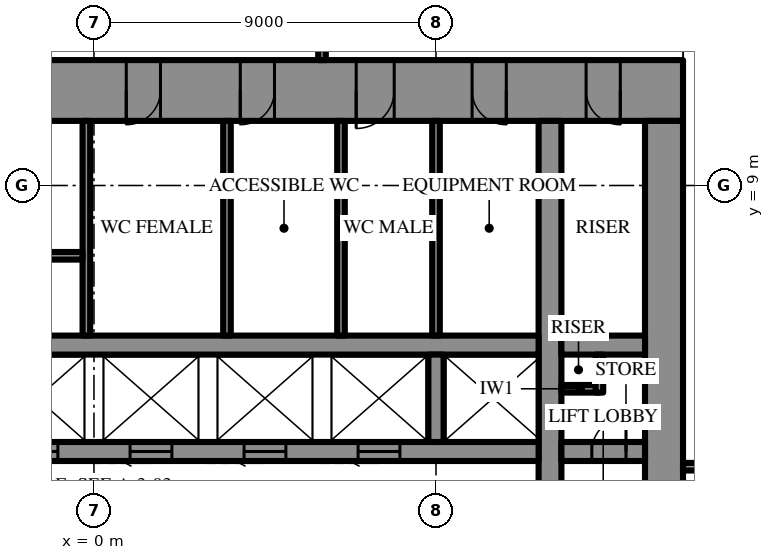
"""IFC4 building model, lengths in metres.
Left out: names, types, materials, properties, quantities, classifications, styles, units other than length and angle.
Written with IfcOpenShell. Run it as: python <this file> out.ifc"""

import sys

from ifc_helpers import new_model, si_unit, direction, frame, frame_2d, origin, place, context, subcontext, project, spatial, rectangle, extrude, element, fill, save


model = new_model("IFC4")
c1 = context("Model", 3, precision=1e-05, world=origin(), true_north=direction((0.0, 1.0)))
c2 = subcontext(c1, "Body", "Model", "MODEL_VIEW")
j1 = project(units=[si_unit("LENGTHUNIT", "METRE"), si_unit("PLANEANGLEUNIT", "RADIAN")], contexts=[c1])
p1 = place(None, origin())
s1 = spatial("IfcSite", under=j1, at=p1, CompositionType="ELEMENT")
p2 = place(p1, origin())
s2 = spatial("IfcBuilding", under=s1, at=p2, CompositionType="ELEMENT")
p3 = place(p2, frame((0.0, 0.0, 295.3)))
s3 = spatial("IfcBuildingStorey", under=s2, at=p3, CompositionType="ELEMENT", Elevation=295.3)
p4 = place(p3, frame((-15.5, 11.5, 0.0), z_axis=(0.0, 0.0, 1.0), x_axis=(1.0, 0.0, 0.0)))
e1 = element("IfcWall", 1, at=p4, inside=s3, PredefinedType="SHEAR", context=c2, shape_type="SweptSolid", body=[
    extrude(rectangle(XDim=31.0, YDim=1.6, at=frame_2d((15.5, 0.0))), origin(), (0.0, 0.0, 1.0), 4.2),
])
p5 = place(p4, frame((16.35, 0.0, 0.0)))
e2 = element("IfcOpeningElement", 2, at=p5, cuts=e1, PredefinedType="OPENING", context=c2, shape_type="SweptSolid", body=[
    extrude(rectangle(XDim=0.9, YDim=2.2, at=frame_2d((0.45, 1.1))), frame((0.0, 0.81, 0.0), z_axis=(0.0, -1.0, 0.0), x_axis=(1.0, 0.0, 0.0)), (0.0, 0.0, 1.0), 1.62),
])
p6 = place(p4, frame((19.35, 0.0, 0.0)))
e3 = element("IfcOpeningElement", 3, at=p6, cuts=e1, PredefinedType="OPENING", context=c2, shape_type="SweptSolid", body=[
    extrude(rectangle(XDim=0.9, YDim=2.2, at=frame_2d((0.45, 1.1))), frame((0.0, 0.81, 0.0), z_axis=(0.0, -1.0, 0.0), x_axis=(1.0, 0.0, 0.0)), (0.0, 0.0, 1.0), 1.62),
])
p7 = place(p4, frame((22.4, 0.0, 0.0)))
e4 = element("IfcOpeningElement", 4, at=p7, cuts=e1, PredefinedType="OPENING", context=c2, shape_type="SweptSolid", body=[
    extrude(rectangle(XDim=1.0, YDim=2.2, at=frame_2d((0.5, 1.1))), frame((0.0, 0.81, 0.0), z_axis=(0.0, -1.0, 0.0), x_axis=(1.0, 0.0, 0.0)), (0.0, 0.0, 1.0), 1.62),
])
p8 = place(p4, frame((1.65, 0.0, 0.0)))
e5 = element("IfcOpeningElement", 5, at=p8, cuts=e1, PredefinedType="OPENING", context=c2, shape_type="SweptSolid", body=[
    extrude(rectangle(XDim=0.9, YDim=2.2, at=frame_2d((0.45, 1.1))), frame((0.0, 0.81, 0.0), z_axis=(0.0, -1.0, 0.0), x_axis=(1.0, 0.0, 0.0)), (0.0, 0.0, 1.0), 1.62),
])
p9 = place(p4, frame((4.65, 0.0, 0.0)))
e6 = element("IfcOpeningElement", 6, at=p9, cuts=e1, PredefinedType="OPENING", context=c2, shape_type="SweptSolid", body=[
    extrude(rectangle(XDim=0.9, YDim=2.2, at=frame_2d((0.45, 1.1))), frame((0.0, 0.81, 0.0), z_axis=(0.0, -1.0, 0.0), x_axis=(1.0, 0.0, 0.0)), (0.0, 0.0, 1.0), 1.62),
])
p10 = place(p4, frame((25.45, 0.0, 0.0)))
e7 = element("IfcOpeningElement", 7, at=p10, cuts=e1, PredefinedType="OPENING", context=c2, shape_type="SweptSolid", body=[
    extrude(rectangle(XDim=0.9, YDim=2.2, at=frame_2d((0.45, 1.1))), frame((0.0, 0.81, 0.0), z_axis=(0.0, -1.0, 0.0), x_axis=(1.0, 0.0, 0.0)), (0.0, 0.0, 1.0), 1.62),
])
p11 = place(p4, frame((28.45, 0.0, 0.0)))
e8 = element("IfcOpeningElement", 8, at=p11, cuts=e1, PredefinedType="OPENING", context=c2, shape_type="SweptSolid", body=[
    extrude(rectangle(XDim=0.9, YDim=2.2, at=frame_2d((0.45, 1.1))), frame((0.0, 0.81, 0.0), z_axis=(0.0, -1.0, 0.0), x_axis=(1.0, 0.0, 0.0)), (0.0, 0.0, 1.0), 1.62),
])
p12 = place(p3, frame((15.0, -10.7, 0.0), z_axis=(0.0, 0.0, 1.0), x_axis=(0.0, 1.0, 0.0)))
e9 = element("IfcWall", 9, at=p12, inside=s3, PredefinedType="SHEAR", context=c2, shape_type="SweptSolid", body=[
    extrude(rectangle(XDim=21.4, YDim=1.0, at=frame_2d((10.7, 0.0))), origin(), (0.0, 0.0, 1.0), 4.2),
])
p13 = place(p12, frame((9.8, 0.0, 0.0)))
e10 = element("IfcOpeningElement", 10, at=p13, cuts=e9, PredefinedType="OPENING", context=c2, shape_type="SweptSolid", body=[
    extrude(rectangle(XDim=1.8, YDim=2.4, at=frame_2d((0.9, 1.2))), frame((0.0, 0.51, 0.0), z_axis=(0.0, -1.0, 0.0), x_axis=(1.0, 0.0, 0.0)), (0.0, 0.0, 1.0), 1.02),
])
p14 = place(p3, frame((12.0, -10.7, 0.0), z_axis=(0.0, 0.0, 1.0), x_axis=(0.0, 1.0, 0.0)))
e11 = element("IfcWall", 11, at=p14, inside=s3, PredefinedType="SHEAR", context=c2, shape_type="SweptSolid", body=[
    extrude(rectangle(XDim=21.4, YDim=0.6, at=frame_2d((10.7, 0.0))), origin(), (0.0, 0.0, 1.0), 4.2),
])
p15 = place(p14, frame((9.8, 0.0, 0.0)))
e12 = element("IfcOpeningElement", 12, at=p15, cuts=e11, PredefinedType="OPENING", context=c2, shape_type="SweptSolid", body=[
    extrude(rectangle(XDim=1.8, YDim=2.4, at=frame_2d((0.9, 1.2))), frame((0.0, 0.31, 0.0), z_axis=(0.0, -1.0, 0.0), x_axis=(1.0, 0.0, 0.0)), (0.0, 0.0, 1.0), 0.62),
])
p16 = place(p3, frame((-3.2, 2.0, 0.0), z_axis=(0.0, 0.0, 1.0), x_axis=(1.0, 0.0, 0.0)))
e13 = element("IfcWall", 13, at=p16, inside=s3, PredefinedType="SHEAR", context=c2, shape_type="SweptSolid", body=[
    extrude(rectangle(XDim=14.9, YDim=0.5, at=frame_2d((7.45, 0.0))), origin(), (0.0, 0.0, 1.0), 4.2),
])
p17 = place(p16, frame((1.15, 0.0, 0.0)))
e14 = element("IfcOpeningElement", 14, at=p17, cuts=e13, PredefinedType="OPENING", context=c2, shape_type="SweptSolid", body=[
    extrude(rectangle(XDim=1.1, YDim=2.2, at=frame_2d((0.55, 1.1))), frame((0.0, 0.26, 0.0), z_axis=(0.0, -1.0, 0.0), x_axis=(1.0, 0.0, 0.0)), (0.0, 0.0, 1.0), 0.52),
])
p18 = place(p16, frame((4.15, 0.0, 0.0)))
e15 = element("IfcOpeningElement", 15, at=p18, cuts=e13, PredefinedType="OPENING", context=c2, shape_type="SweptSolid", body=[
    extrude(rectangle(XDim=1.1, YDim=2.2, at=frame_2d((0.55, 1.1))), frame((0.0, 0.26, 0.0), z_axis=(0.0, -1.0, 0.0), x_axis=(1.0, 0.0, 0.0)), (0.0, 0.0, 1.0), 0.52),
])
p19 = place(p16, frame((7.15, 0.0, 0.0)))
e16 = element("IfcOpeningElement", 16, at=p19, cuts=e13, PredefinedType="OPENING", context=c2, shape_type="SweptSolid", body=[
    extrude(rectangle(XDim=1.1, YDim=2.2, at=frame_2d((0.55, 1.1))), frame((0.0, 0.26, 0.0), z_axis=(0.0, -1.0, 0.0), x_axis=(1.0, 0.0, 0.0)), (0.0, 0.0, 1.0), 0.52),
])
p20 = place(p16, frame((10.15, 0.0, 0.0)))
e17 = element("IfcOpeningElement", 17, at=p20, cuts=e13, PredefinedType="OPENING", context=c2, shape_type="SweptSolid", body=[
    extrude(rectangle(XDim=1.1, YDim=2.2, at=frame_2d((0.55, 1.1))), frame((0.0, 0.26, 0.0), z_axis=(0.0, -1.0, 0.0), x_axis=(1.0, 0.0, 0.0)), (0.0, 0.0, 1.0), 0.52),
])
p21 = place(p3, frame((12.3, 2.0, 0.0), z_axis=(0.0, 0.0, 1.0), x_axis=(1.0, 0.0, 0.0)))
e18 = element("IfcWall", 18, at=p21, inside=s3, PredefinedType="SHEAR", context=c2, shape_type="SweptSolid", body=[
    extrude(rectangle(XDim=2.2, YDim=0.5, at=frame_2d((1.1, 0.0))), origin(), (0.0, 0.0, 1.0), 4.2),
])
p22 = place(p21, frame((0.8, 0.0, 0.0)))
e19 = element("IfcOpeningElement", 19, at=p22, cuts=e18, PredefinedType="OPENING", context=c2, shape_type="SweptSolid", body=[
    extrude(rectangle(XDim=0.9, YDim=2.2, at=frame_2d((0.45, 1.1))), frame((0.0, 0.26, 0.0), z_axis=(0.0, -1.0, 0.0), x_axis=(1.0, 0.0, 0.0)), (0.0, 0.0, 1.0), 0.52),
])
p23 = place(p3, frame((-11.7, 4.8, 0.0), z_axis=(0.0, 0.0, 1.0), x_axis=(1.0, 0.0, 0.0)))
e20 = element("IfcWall", 20, at=p23, inside=s3, PredefinedType="SHEAR", context=c2, shape_type="SweptSolid", body=[
    extrude(rectangle(XDim=23.4, YDim=0.5, at=frame_2d((11.7, 0.0))), origin(), (0.0, 0.0, 1.0), 4.2),
])
p24 = place(p23, frame((6.6, 0.0, 0.0)))
e21 = element("IfcOpeningElement", 21, at=p24, cuts=e20, PredefinedType="OPENING", context=c2, shape_type="SweptSolid", body=[
    extrude(rectangle(XDim=1.2, YDim=2.2, at=frame_2d((0.6, 1.1))), frame((0.0, 0.26, 0.0), z_axis=(0.0, -1.0, 0.0), x_axis=(1.0, 0.0, 0.0)), (0.0, 0.0, 1.0), 0.52),
])
p25 = place(p23, frame((3.6, 0.0, 0.0)))
e22 = element("IfcOpeningElement", 22, at=p25, cuts=e20, PredefinedType="OPENING", context=c2, shape_type="SweptSolid", body=[
    extrude(rectangle(XDim=1.2, YDim=2.2, at=frame_2d((0.6, 1.1))), frame((0.0, 0.26, 0.0), z_axis=(0.0, -1.0, 0.0), x_axis=(1.0, 0.0, 0.0)), (0.0, 0.0, 1.0), 0.52),
])
p26 = place(p3, frame((12.3, 4.8, 0.0), z_axis=(0.0, 0.0, 1.0), x_axis=(1.0, 0.0, 0.0)))
e23 = element("IfcWall", 23, at=p26, inside=s3, PredefinedType="SHEAR", context=c2, shape_type="SweptSolid", body=[
    extrude(rectangle(XDim=2.2, YDim=0.5, at=frame_2d((1.1, 0.0))), origin(), (0.0, 0.0, 1.0), 4.2),
])
p27 = place(p3, frame((9.0, 2.25, 0.0), z_axis=(0.0, 0.0, 1.0), x_axis=(0.0, 1.0, 0.0)))
e24 = element("IfcWall", 24, at=p27, inside=s3, PredefinedType="SHEAR", context=c2, shape_type="SweptSolid", body=[
    extrude(rectangle(XDim=2.3, YDim=0.4, at=frame_2d((1.15, 0.0))), origin(), (0.0, 0.0, 1.0), 4.2),
])
p28 = place(p3, frame((-0.2, 5.05, 0.0), z_axis=(0.0, 0.0, 1.0), x_axis=(0.0, 1.0, 0.0)))
e25 = element("IfcWall", 25, at=p28, inside=s3, PredefinedType="SHEAR", context=c2, shape_type="SweptSolid", body=[
    extrude(rectangle(XDim=5.65, YDim=0.2, at=frame_2d((2.825, 0.0))), origin(), (0.0, 0.0, 1.0), 4.2),
])
p29 = place(p3, frame((-8.9, 7.15, 0.0), z_axis=(0.0, 0.0, 1.0), x_axis=(1.0, 0.0, 0.0)))
e26 = element("IfcWall", 26, at=p29, inside=s3, PredefinedType="SHEAR", context=c2, shape_type="SweptSolid", body=[
    extrude(rectangle(XDim=8.6, YDim=0.2, at=frame_2d((4.3, 0.0))), origin(), (0.0, 0.0, 1.0), 4.2),
])
p30 = place(p29, frame((0.3, 0.0, 0.0)))
e27 = element("IfcOpeningElement", 27, at=p30, cuts=e26, PredefinedType="OPENING", context=c2, shape_type="SweptSolid", body=[
    extrude(rectangle(XDim=1.0, YDim=2.2, at=frame_2d((0.5, 1.1))), frame((0.0, 0.11, 0.0), z_axis=(0.0, -1.0, 0.0), x_axis=(1.0, 0.0, 0.0)), (0.0, 0.0, 1.0), 0.22),
])
for number, where, z_axis, x_axis in (
    (28, (9.0, 5.05, 0.0), (0.0, 0.0, 1.0), (0.0, 1.0, 0.0)),
    (29, (3.5, 5.05, 0.0), (0.0, 0.0, 1.0), (0.0, 1.0, 0.0)),
    (30, (6.5, 5.05, 0.0), (0.0, 0.0, 1.0), (0.0, 1.0, 0.0)),
):
    element("IfcWall", number, at=place(p3, frame(where, z_axis=z_axis, x_axis=x_axis)), inside=s3, PredefinedType="PARTITIONING", context=c2, shape_type="SweptSolid", body=[
        extrude(rectangle(XDim=5.65, YDim=0.2, at=frame_2d((2.825, 0.0))), origin(), (0.0, 0.0, 1.0), 3.9),
    ])
for number, where, z_axis, x_axis in (
    (31, (12.3, 3.65, 0.0), (0.0, 0.0, 1.0), (1.0, 0.0, 0.0)),
    (32, (13.3, 3.55, 0.0), (0.0, 0.0, 1.0), (0.0, 1.0, 0.0)),
):
    element("IfcWall", number, at=place(p3, frame(where, z_axis=z_axis, x_axis=x_axis)), inside=s3, PredefinedType="PARTITIONING", context=c2, shape_type="SweptSolid", body=[
        extrude(rectangle(XDim=1.0, YDim=0.2, at=frame_2d((0.5, 0.0))), origin(), (0.0, 0.0, 1.0), 3.9),
    ])
p31 = place(p3, frame((22.711, 7.663, 0.0), z_axis=(0.0, 0.0, 1.0), x_axis=(-0.499989069193, 0.866031714597, 0.0)))
e33 = element("IfcWall", 33, at=p31, inside=s3, PredefinedType="PARTITIONING", context=c2, shape_type="SweptSolid", body=[
    extrude(rectangle(XDim=14.056, YDim=0.2, at=frame_2d((7.028, 0.0))), origin(), (0.0, 0.0, 1.0), 3.9),
])
p32 = place(p31, frame((6.528, 0.0, 0.0)))
e34 = element("IfcOpeningElement", 34, at=p32, cuts=e33, PredefinedType="OPENING", context=c2, shape_type="SweptSolid", body=[
    extrude(rectangle(XDim=1.0, YDim=2.2, at=frame_2d((0.5, 1.1))), frame((0.0, 0.11, 0.0), z_axis=(0.0, -1.0, 0.0), x_axis=(1.0, 0.0, 0.0)), (0.0, 0.0, 1.0), 0.22),
])
p33 = place(p3, frame((15.5, 1.6, 0.0), z_axis=(0.0, 0.0, 1.0), x_axis=(1.0, 0.0, 0.0)))
e35 = element("IfcWall", 35, at=p33, inside=s3, PredefinedType="PARTITIONING", context=c2, shape_type="SweptSolid", body=[
    extrude(rectangle(XDim=12.2, YDim=0.2, at=frame_2d((6.1, 0.0))), origin(), (0.0, 0.0, 1.0), 3.9),
])
p34 = place(p33, frame((8.04, 0.0, 0.0)))
e36 = element("IfcOpeningElement", 36, at=p34, cuts=e35, PredefinedType="OPENING", context=c2, shape_type="SweptSolid", body=[
    extrude(rectangle(XDim=1.0, YDim=2.2, at=frame_2d((0.5, 1.1))), frame((0.0, 0.11, 0.0), z_axis=(0.0, -1.0, 0.0), x_axis=(1.0, 0.0, 0.0)), (0.0, 0.0, 1.0), 0.22),
])
p35 = place(p3, frame((6.0, 12.3, 0.0), z_axis=(0.0, 0.0, 1.0), x_axis=(0.0, 1.0, 0.0)))
e37 = element("IfcWall", 37, at=p35, inside=s3, PredefinedType="PARTITIONING", context=c2, shape_type="SweptSolid", body=[
    extrude(rectangle(XDim=1.7, YDim=0.2, at=frame_2d((0.85, 0.0))), origin(), (0.0, 0.0, 1.0), 3.9),
])
p36 = place(p35, frame((0.35, 0.0, 0.0)))
e38 = element("IfcOpeningElement", 38, at=p36, cuts=e37, PredefinedType="OPENING", context=c2, shape_type="SweptSolid", body=[
    extrude(rectangle(XDim=1.0, YDim=2.2, at=frame_2d((0.5, 1.1))), frame((0.0, 0.11, 0.0), z_axis=(0.0, -1.0, 0.0), x_axis=(1.0, 0.0, 0.0)), (0.0, 0.0, 1.0), 0.22),
])
p37 = place(p5, frame((0.9, 0.0, 0.0), z_axis=(0.0, 0.0, 1.0), x_axis=(-1.0, 0.0, 0.0)))
e39 = element("IfcDoor", 39, at=p37, inside=s3, OperationType="SINGLE_SWING_LEFT", PredefinedType="DOOR", context=c2, shape_type="SweptSolid", body=[
    extrude(rectangle(XDim=0.9, YDim=2.2, at=frame_2d((0.45, 1.1))), frame((0.0, 0.025, 0.0), z_axis=(0.0, -1.0, 0.0), x_axis=(1.0, 0.0, 0.0)), (0.0, 0.0, 1.0), 0.05),
])
fill(e2, e39)
p38 = place(p6, frame((0.9, 0.0, 0.0), z_axis=(0.0, 0.0, 1.0), x_axis=(-1.0, 0.0, 0.0)))
e40 = element("IfcDoor", 40, at=p38, inside=s3, OperationType="SINGLE_SWING_LEFT", PredefinedType="DOOR", context=c2, shape_type="SweptSolid", body=[
    extrude(rectangle(XDim=0.9, YDim=2.2, at=frame_2d((0.45, 1.1))), frame((0.0, 0.025, 0.0), z_axis=(0.0, -1.0, 0.0), x_axis=(1.0, 0.0, 0.0)), (0.0, 0.0, 1.0), 0.05),
])
fill(e3, e40)
p39 = place(p7, frame((1.0, 0.0, 0.0), z_axis=(0.0, 0.0, 1.0), x_axis=(-1.0, 0.0, 0.0)))
e41 = element("IfcDoor", 41, at=p39, inside=s3, OperationType="SINGLE_SWING_LEFT", PredefinedType="DOOR", context=c2, shape_type="SweptSolid", body=[
    extrude(rectangle(XDim=1.0, YDim=2.2, at=frame_2d((0.5, 1.1))), frame((0.0, 0.025, 0.0), z_axis=(0.0, -1.0, 0.0), x_axis=(1.0, 0.0, 0.0)), (0.0, 0.0, 1.0), 0.05),
])
fill(e4, e41)
p40 = place(p10, frame((0.9, 0.0, 0.0), z_axis=(0.0, 0.0, 1.0), x_axis=(-1.0, 0.0, 0.0)))
e42 = element("IfcDoor", 42, at=p40, inside=s3, OperationType="SINGLE_SWING_RIGHT", PredefinedType="DOOR", context=c2, shape_type="SweptSolid", body=[
    extrude(rectangle(XDim=0.9, YDim=2.2, at=frame_2d((0.45, 1.1))), frame((0.0, 0.025, 0.0), z_axis=(0.0, -1.0, 0.0), x_axis=(1.0, 0.0, 0.0)), (0.0, 0.0, 1.0), 0.05),
])
fill(e7, e42)
p41 = place(p11, frame((0.9, 0.0, 0.0), z_axis=(0.0, 0.0, 1.0), x_axis=(-1.0, 0.0, 0.0)))
e43 = element("IfcDoor", 43, at=p41, inside=s3, OperationType="SINGLE_SWING_RIGHT", PredefinedType="DOOR", context=c2, shape_type="SweptSolid", body=[
    extrude(rectangle(XDim=0.9, YDim=2.2, at=frame_2d((0.45, 1.1))), frame((0.0, 0.025, 0.0), z_axis=(0.0, -1.0, 0.0), x_axis=(1.0, 0.0, 0.0)), (0.0, 0.0, 1.0), 0.05),
])
fill(e8, e43)
p42 = place(p22, origin())
e44 = element("IfcDoor", 44, at=p42, inside=s3, OperationType="SINGLE_SWING_LEFT", PredefinedType="DOOR", context=c2, shape_type="SweptSolid", body=[
    extrude(rectangle(XDim=0.9, YDim=2.2, at=frame_2d((0.45, 1.1))), frame((0.0, 0.025, 0.0), z_axis=(0.0, -1.0, 0.0), x_axis=(1.0, 0.0, 0.0)), (0.0, 0.0, 1.0), 0.05),
])
fill(e19, e44)
p43 = place(p17, frame((1.1, 0.0, 0.0), z_axis=(0.0, 0.0, 1.0), x_axis=(-1.0, 0.0, 0.0)))
e45 = element("IfcDoor", 45, at=p43, inside=s3, OperationType="SLIDING_TO_LEFT", PredefinedType="DOOR", context=c2, shape_type="SweptSolid", body=[
    extrude(rectangle(XDim=1.1, YDim=2.2, at=frame_2d((0.55, 1.1))), frame((0.0, 0.025, 0.0), z_axis=(0.0, -1.0, 0.0), x_axis=(1.0, 0.0, 0.0)), (0.0, 0.0, 1.0), 0.05),
])
fill(e14, e45)
p44 = place(p18, frame((1.1, 0.0, 0.0), z_axis=(0.0, 0.0, 1.0), x_axis=(-1.0, 0.0, 0.0)))
e46 = element("IfcDoor", 46, at=p44, inside=s3, OperationType="SLIDING_TO_LEFT", PredefinedType="DOOR", context=c2, shape_type="SweptSolid", body=[
    extrude(rectangle(XDim=1.1, YDim=2.2, at=frame_2d((0.55, 1.1))), frame((0.0, 0.025, 0.0), z_axis=(0.0, -1.0, 0.0), x_axis=(1.0, 0.0, 0.0)), (0.0, 0.0, 1.0), 0.05),
])
fill(e15, e46)
p45 = place(p19, frame((1.1, 0.0, 0.0), z_axis=(0.0, 0.0, 1.0), x_axis=(-1.0, 0.0, 0.0)))
e47 = element("IfcDoor", 47, at=p45, inside=s3, OperationType="SLIDING_TO_LEFT", PredefinedType="DOOR", context=c2, shape_type="SweptSolid", body=[
    extrude(rectangle(XDim=1.1, YDim=2.2, at=frame_2d((0.55, 1.1))), frame((0.0, 0.025, 0.0), z_axis=(0.0, -1.0, 0.0), x_axis=(1.0, 0.0, 0.0)), (0.0, 0.0, 1.0), 0.05),
])
fill(e16, e47)
p46 = place(p20, frame((1.1, 0.0, 0.0), z_axis=(0.0, 0.0, 1.0), x_axis=(-1.0, 0.0, 0.0)))
e48 = element("IfcDoor", 48, at=p46, inside=s3, OperationType="SLIDING_TO_LEFT", PredefinedType="DOOR", context=c2, shape_type="SweptSolid", body=[
    extrude(rectangle(XDim=1.1, YDim=2.2, at=frame_2d((0.55, 1.1))), frame((0.0, 0.025, 0.0), z_axis=(0.0, -1.0, 0.0), x_axis=(1.0, 0.0, 0.0)), (0.0, 0.0, 1.0), 0.05),
])
fill(e17, e48)
save(model, sys.argv[1])
